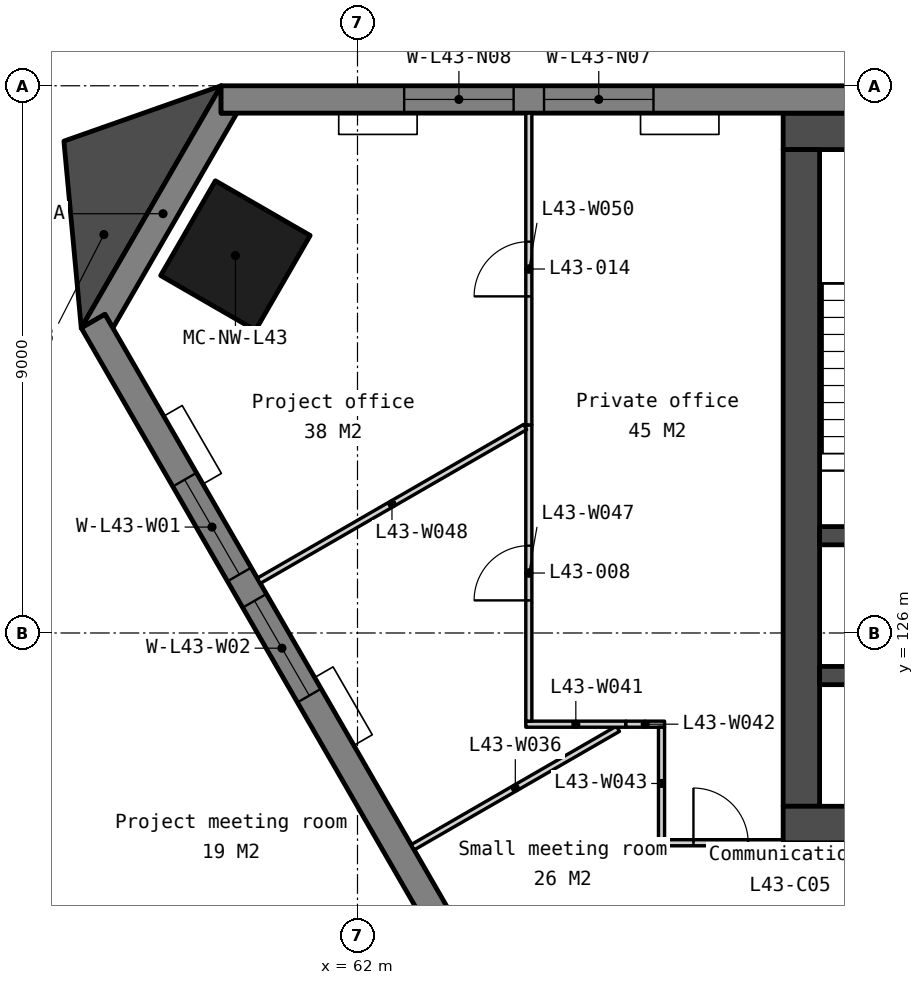
"""IFC4 building model, lengths in metres.
Left out: names, types, materials, properties, quantities, classifications, styles, units other than length and angle.
Written with IfcOpenShell. Run it as: python <this file> out.ifc"""

import sys

from ifc_helpers import new_model, si_unit, direction, frame, frame_2d, origin, origin_2d, place, context, subcontext, project, spatial, polyline, rectangle, outline, extrude, element, fill, save


model = new_model("IFC4")
c1 = context("Model", 3, precision=1e-05, world=origin(), true_north=direction((0.0, 1.0)))
c2 = subcontext(c1, "Body", "Model", "MODEL_VIEW")
j1 = project(units=[si_unit("LENGTHUNIT", "METRE"), si_unit("PLANEANGLEUNIT", "RADIAN")], contexts=[c1])
p1 = place(None, origin())
s1 = spatial("IfcSite", under=j1, at=p1, CompositionType="ELEMENT")
p2 = place(p1, origin())
s2 = spatial("IfcBuilding", under=s1, at=p2, CompositionType="ELEMENT")
p3 = place(p2, frame((0.0, 0.0, 171.5)))
s3 = spatial("IfcBuildingStorey", under=s2, at=p3, CompositionType="ELEMENT", Elevation=171.5)
p4 = place(p3, frame((59.993, 132.208, 0.0), z_axis=(0.0, 0.0, 1.0), x_axis=(-0.5, -0.866025403784, 0.0)))
e1 = element("IfcColumn", 1, at=p4, inside=s3, PredefinedType="COLUMN", context=c2, shape_type="SweptSolid", body=[
    extrude(rectangle(XDim=1.8, YDim=1.8, at=origin_2d()), origin(), (0.0, 0.0, 1.0), 3.9),
])
p5 = place(p3, frame((69.0, 134.25, 0.0), z_axis=(0.0, 0.0, 1.0), x_axis=(1.0, 0.0, 0.0)))
e2 = element("IfcWall", 2, at=p5, inside=s3, PredefinedType="SOLIDWALL", context=c2, shape_type="SweptSolid", body=[
    extrude(rectangle(XDim=22.0, YDim=0.6, at=frame_2d((11.0, 0.0))), origin(), (0.0, 0.0, 1.0), 3.65),
])
p6 = place(p3, frame((69.3, 133.95, 0.0), z_axis=(0.0, 0.0, 1.0), x_axis=(0.0, -1.0, 0.0)))
e3 = element("IfcWall", 3, at=p6, inside=s3, PredefinedType="SOLIDWALL", context=c2, shape_type="SweptSolid", body=[
    extrude(rectangle(XDim=10.8, YDim=0.6, at=frame_2d((5.4, 0.0))), origin(), (0.0, 0.0, 1.0), 3.65),
])
p7 = place(p3, frame((69.0, 122.85, 0.0), z_axis=(0.0, 0.0, 1.0), x_axis=(1.0, 0.0, 0.0)))
e4 = element("IfcWall", 4, at=p7, inside=s3, PredefinedType="SOLIDWALL", context=c2, shape_type="SweptSolid", body=[
    extrude(rectangle(XDim=22.0, YDim=0.6, at=frame_2d((11.0, 0.0))), origin(), (0.0, 0.0, 1.0), 3.65),
])
p8 = place(p7, frame((16.375, 0.0, 0.0)))
e5 = element("IfcOpeningElement", 5, at=p8, cuts=e4, PredefinedType="OPENING", context=c2, shape_type="SweptSolid", body=[
    extrude(rectangle(XDim=1.8, YDim=2.1, at=frame_2d((0.9, 1.05))), frame((0.0, 0.31, 0.0), z_axis=(0.0, -1.0, 0.0), x_axis=(1.0, 0.0, 0.0)), (0.0, 0.0, 1.0), 0.62),
])
p9 = place(p7, frame((3.825, 0.0, 0.0)))
e6 = element("IfcOpeningElement", 6, at=p9, cuts=e4, PredefinedType="OPENING", context=c2, shape_type="SweptSolid", body=[
    extrude(rectangle(XDim=1.8, YDim=2.1, at=frame_2d((0.9, 1.05))), frame((0.0, 0.31, 0.0), z_axis=(0.0, -1.0, 0.0), x_axis=(1.0, 0.0, 0.0)), (0.0, 0.0, 1.0), 0.62),
])
p10 = place(p7, frame((12.85, 0.0, 0.0)))
e7 = element("IfcOpeningElement", 7, at=p10, cuts=e4, PredefinedType="OPENING", context=c2, shape_type="SweptSolid", body=[
    extrude(rectangle(XDim=1.5, YDim=2.1, at=frame_2d((0.75, 1.05))), frame((0.0, 0.31, 0.0), z_axis=(0.0, -1.0, 0.0), x_axis=(1.0, 0.0, 0.0)), (0.0, 0.0, 1.0), 0.62),
])
for number, where, z_axis, x_axis in (
    (8, (69.6, 127.6, 0.0), (0.0, 0.0, 1.0), (1.0, 0.0, 0.0)),
    (9, (69.6, 125.3, 0.0), (0.0, 0.0, 1.0), (1.0, 0.0, 0.0)),
):
    element("IfcWall", number, at=place(p3, frame(where, z_axis=z_axis, x_axis=x_axis)), inside=s3, PredefinedType="SOLIDWALL", context=c2, shape_type="SweptSolid", body=[
        extrude(rectangle(XDim=2.55, YDim=0.3, at=frame_2d((1.275, 0.0))), origin(), (0.0, 0.0, 1.0), 3.65),
    ])
p11 = place(p3, frame((0.0, 0.0, -0.15)))
e10 = element("IfcWall", 10, at=p11, inside=s3, PredefinedType="SOLIDWALL", context=c2, shape_type="SweptSolid", body=[
    extrude(outline(polyline([(59.757, 135.0), (59.757, 134.55), (60.017, 134.55), (57.977, 131.016), (57.847, 131.241), (57.457, 131.016), (59.757, 135.0)])), origin(), (0.0, 0.0, 1.0), 3.8),
])
p12 = place(p3, frame((100.243, 134.775, -0.15), z_axis=(0.0, 0.0, 1.0), x_axis=(-1.0, 0.0, 0.0)))
e11 = element("IfcWall", 11, at=p12, inside=s3, PredefinedType="SOLIDWALL", context=c2, shape_type="SweptSolid", body=[
    extrude(outline(polyline([(40.486, 0.0), (40.486, 3.8), (0.0, 3.8), (0.0, 0.0), (40.486, 0.0)])), frame((0.0, 0.225, 0.0), z_axis=(0.0, -1.0, 0.0), x_axis=(1.0, 0.0, 0.0)), (0.0, 0.0, 1.0), 0.45),
])
p13 = place(p12, frame((3.011, 0.0, 0.95)))
e12 = element("IfcOpeningElement", 12, at=p13, cuts=e11, PredefinedType="OPENING", context=c2, shape_type="SweptSolid", body=[
    extrude(rectangle(XDim=1.8, YDim=2.2, at=frame_2d((0.9, 1.1))), frame((0.0, 0.235, 0.0), z_axis=(0.0, -1.0, 0.0), x_axis=(1.0, 0.0, 0.0)), (0.0, 0.0, 1.0), 0.47),
])
p14 = place(p12, frame((5.311, 0.0, 0.95)))
e13 = element("IfcOpeningElement", 13, at=p14, cuts=e11, PredefinedType="OPENING", context=c2, shape_type="SweptSolid", body=[
    extrude(rectangle(XDim=1.8, YDim=2.2, at=frame_2d((0.9, 1.1))), frame((0.0, 0.235, 0.0), z_axis=(0.0, -1.0, 0.0), x_axis=(1.0, 0.0, 0.0)), (0.0, 0.0, 1.0), 0.47),
])
p15 = place(p12, frame((13.132, 0.0, 0.95)))
e14 = element("IfcOpeningElement", 14, at=p15, cuts=e11, PredefinedType="OPENING", context=c2, shape_type="SweptSolid", body=[
    extrude(rectangle(XDim=1.8, YDim=2.2, at=frame_2d((0.9, 1.1))), frame((0.0, 0.235, 0.0), z_axis=(0.0, -1.0, 0.0), x_axis=(1.0, 0.0, 0.0)), (0.0, 0.0, 1.0), 0.47),
])
p16 = place(p12, frame((15.432, 0.0, 0.95)))
e15 = element("IfcOpeningElement", 15, at=p16, cuts=e11, PredefinedType="OPENING", context=c2, shape_type="SweptSolid", body=[
    extrude(rectangle(XDim=1.8, YDim=2.2, at=frame_2d((0.9, 1.1))), frame((0.0, 0.235, 0.0), z_axis=(0.0, -1.0, 0.0), x_axis=(1.0, 0.0, 0.0)), (0.0, 0.0, 1.0), 0.47),
])
p17 = place(p12, frame((23.254, 0.0, 0.95)))
e16 = element("IfcOpeningElement", 16, at=p17, cuts=e11, PredefinedType="OPENING", context=c2, shape_type="SweptSolid", body=[
    extrude(rectangle(XDim=1.8, YDim=2.2, at=frame_2d((0.9, 1.1))), frame((0.0, 0.235, 0.0), z_axis=(0.0, -1.0, 0.0), x_axis=(1.0, 0.0, 0.0)), (0.0, 0.0, 1.0), 0.47),
])
p18 = place(p12, frame((25.554, 0.0, 0.95)))
e17 = element("IfcOpeningElement", 17, at=p18, cuts=e11, PredefinedType="OPENING", context=c2, shape_type="SweptSolid", body=[
    extrude(rectangle(XDim=1.8, YDim=2.2, at=frame_2d((0.9, 1.1))), frame((0.0, 0.235, 0.0), z_axis=(0.0, -1.0, 0.0), x_axis=(1.0, 0.0, 0.0)), (0.0, 0.0, 1.0), 0.47),
])
p19 = place(p12, frame((33.375, 0.0, 0.95)))
e18 = element("IfcOpeningElement", 18, at=p19, cuts=e11, PredefinedType="OPENING", context=c2, shape_type="SweptSolid", body=[
    extrude(rectangle(XDim=1.8, YDim=2.2, at=frame_2d((0.9, 1.1))), frame((0.0, 0.235, 0.0), z_axis=(0.0, -1.0, 0.0), x_axis=(1.0, 0.0, 0.0)), (0.0, 0.0, 1.0), 0.47),
])
p20 = place(p12, frame((35.675, 0.0, 0.95)))
e19 = element("IfcOpeningElement", 19, at=p20, cuts=e11, PredefinedType="OPENING", context=c2, shape_type="SweptSolid", body=[
    extrude(rectangle(XDim=1.8, YDim=2.2, at=frame_2d((0.9, 1.1))), frame((0.0, 0.235, 0.0), z_axis=(0.0, -1.0, 0.0), x_axis=(1.0, 0.0, 0.0)), (0.0, 0.0, 1.0), 0.47),
])
p21 = place(p3, frame((57.652, 131.129, -0.15), z_axis=(0.0, 0.0, 1.0), x_axis=(0.499997369791, -0.866026922331, 0.0)))
e20 = element("IfcWall", 20, at=p21, inside=s3, PredefinedType="SOLIDWALL", context=c2, shape_type="SweptSolid", body=[
    extrude(outline(polyline([(40.486, 0.0), (40.486, 3.8), (0.0, 3.8), (0.0, 0.0), (40.486, 0.0)])), frame((0.0, 0.225, 0.0), z_axis=(0.0, -1.0, 0.0), x_axis=(1.0, 0.0, 0.0)), (0.0, 0.0, 1.0), 0.45),
])
p22 = place(p21, frame((3.011, 0.0, 0.95)))
e21 = element("IfcOpeningElement", 21, at=p22, cuts=e20, PredefinedType="OPENING", context=c2, shape_type="SweptSolid", body=[
    extrude(rectangle(XDim=1.8, YDim=2.2, at=frame_2d((0.9, 1.1))), frame((0.0, 0.235, 0.0), z_axis=(0.0, -1.0, 0.0), x_axis=(1.0, 0.0, 0.0)), (0.0, 0.0, 1.0), 0.47),
])
p23 = place(p21, frame((5.311, 0.0, 0.95)))
e22 = element("IfcOpeningElement", 22, at=p23, cuts=e20, PredefinedType="OPENING", context=c2, shape_type="SweptSolid", body=[
    extrude(rectangle(XDim=1.8, YDim=2.2, at=frame_2d((0.9, 1.1))), frame((0.0, 0.235, 0.0), z_axis=(0.0, -1.0, 0.0), x_axis=(1.0, 0.0, 0.0)), (0.0, 0.0, 1.0), 0.47),
])
p24 = place(p21, frame((13.132, 0.0, 0.95)))
e23 = element("IfcOpeningElement", 23, at=p24, cuts=e20, PredefinedType="OPENING", context=c2, shape_type="SweptSolid", body=[
    extrude(rectangle(XDim=1.8, YDim=2.2, at=frame_2d((0.9, 1.1))), frame((0.0, 0.235, 0.0), z_axis=(0.0, -1.0, 0.0), x_axis=(1.0, 0.0, 0.0)), (0.0, 0.0, 1.0), 0.47),
])
p25 = place(p21, frame((15.432, 0.0, 0.95)))
e24 = element("IfcOpeningElement", 24, at=p25, cuts=e20, PredefinedType="OPENING", context=c2, shape_type="SweptSolid", body=[
    extrude(rectangle(XDim=1.8, YDim=2.2, at=frame_2d((0.9, 1.1))), frame((0.0, 0.235, 0.0), z_axis=(0.0, -1.0, 0.0), x_axis=(1.0, 0.0, 0.0)), (0.0, 0.0, 1.0), 0.47),
])
p26 = place(p21, frame((23.254, 0.0, 0.95)))
e25 = element("IfcOpeningElement", 25, at=p26, cuts=e20, PredefinedType="OPENING", context=c2, shape_type="SweptSolid", body=[
    extrude(rectangle(XDim=1.8, YDim=2.2, at=frame_2d((0.9, 1.1))), frame((0.0, 0.235, 0.0), z_axis=(0.0, -1.0, 0.0), x_axis=(1.0, 0.0, 0.0)), (0.0, 0.0, 1.0), 0.47),
])
p27 = place(p21, frame((25.554, 0.0, 0.95)))
e26 = element("IfcOpeningElement", 26, at=p27, cuts=e20, PredefinedType="OPENING", context=c2, shape_type="SweptSolid", body=[
    extrude(rectangle(XDim=1.8, YDim=2.2, at=frame_2d((0.9, 1.1))), frame((0.0, 0.235, 0.0), z_axis=(0.0, -1.0, 0.0), x_axis=(1.0, 0.0, 0.0)), (0.0, 0.0, 1.0), 0.47),
])
p28 = place(p21, frame((33.375, 0.0, 0.95)))
e27 = element("IfcOpeningElement", 27, at=p28, cuts=e20, PredefinedType="OPENING", context=c2, shape_type="SweptSolid", body=[
    extrude(rectangle(XDim=1.8, YDim=2.2, at=frame_2d((0.9, 1.1))), frame((0.0, 0.235, 0.0), z_axis=(0.0, -1.0, 0.0), x_axis=(1.0, 0.0, 0.0)), (0.0, 0.0, 1.0), 0.47),
])
p29 = place(p21, frame((35.675, 0.0, 0.95)))
e28 = element("IfcOpeningElement", 28, at=p29, cuts=e20, PredefinedType="OPENING", context=c2, shape_type="SweptSolid", body=[
    extrude(rectangle(XDim=1.8, YDim=2.2, at=frame_2d((0.9, 1.1))), frame((0.0, 0.235, 0.0), z_axis=(0.0, -1.0, 0.0), x_axis=(1.0, 0.0, 0.0)), (0.0, 0.0, 1.0), 0.47),
])
p30 = place(p3, frame((0.0, 0.0, -0.15)))
e29 = element("IfcWall", 29, at=p30, inside=s3, PredefinedType="SOLIDWALL", context=c2, shape_type="SweptSolid", body=[
    extrude(outline(polyline([(59.757, 135.0), (57.172, 134.09), (57.457, 131.016), (59.757, 135.0)])), origin(), (0.0, 0.0, 1.0), 3.8),
])
p31 = place(p3, frame((65.438, 118.093, 0.0), z_axis=(0.0, 0.0, 1.0), x_axis=(0.866029768103, 0.499992440702, 0.0)))
e30 = element("IfcWall", 30, at=p31, inside=s3, PredefinedType="PARTITIONING", context=c2, shape_type="SweptSolid", body=[
    extrude(rectangle(XDim=8.089, YDim=0.1, at=frame_2d((4.044, 0.0))), origin(), (0.0, 0.0, 1.0), 3.65),
])
p32 = place(p31, frame((3.594, 0.0, 0.0)))
e31 = element("IfcOpeningElement", 31, at=p32, cuts=e30, PredefinedType="OPENING", context=c2, shape_type="SweptSolid", body=[
    extrude(rectangle(XDim=0.9, YDim=2.1, at=frame_2d((0.45, 1.05))), frame((0.0, 0.06, 0.0), z_axis=(0.0, -1.0, 0.0), x_axis=(1.0, 0.0, 0.0)), (0.0, 0.0, 1.0), 0.12),
])
p33 = place(p3, frame((62.907, 122.476, 0.0), z_axis=(0.0, 0.0, 1.0), x_axis=(0.866014543207, 0.500018810599, 0.0)))
e32 = element("IfcWall", 32, at=p33, inside=s3, PredefinedType="PARTITIONING", context=c2, shape_type="SweptSolid", body=[
    extrude(rectangle(XDim=3.898, YDim=0.1, at=frame_2d((1.949, 0.0))), origin(), (0.0, 0.0, 1.0), 3.65),
])
p34 = place(p3, frame((66.95, 122.55, 0.0), z_axis=(0.0, 0.0, 1.0), x_axis=(1.0, 0.0, 0.0)))
e33 = element("IfcWall", 33, at=p34, inside=s3, PredefinedType="PARTITIONING", context=c2, shape_type="SweptSolid", body=[
    extrude(rectangle(XDim=2.05, YDim=0.1, at=frame_2d((1.025, 0.0))), origin(), (0.0, 0.0, 1.0), 3.65),
])
p35 = place(p34, frame((0.575, 0.0, 0.0)))
e34 = element("IfcOpeningElement", 34, at=p35, cuts=e33, PredefinedType="OPENING", context=c2, shape_type="SweptSolid", body=[
    extrude(rectangle(XDim=0.9, YDim=2.1, at=frame_2d((0.45, 1.05))), frame((0.0, 0.06, 0.0), z_axis=(0.0, -1.0, 0.0), x_axis=(1.0, 0.0, 0.0)), (0.0, 0.0, 1.0), 0.12),
])
p36 = place(p3, frame((64.768, 124.5, 0.0), z_axis=(0.0, 0.0, 1.0), x_axis=(1.0, 0.0, 0.0)))
e35 = element("IfcWall", 35, at=p36, inside=s3, PredefinedType="PARTITIONING", context=c2, shape_type="SweptSolid", body=[
    extrude(rectangle(XDim=1.646, YDim=0.1, at=frame_2d((0.823, 0.0))), origin(), (0.0, 0.0, 1.0), 3.65),
])
p37 = place(p3, frame((66.414, 124.5, 0.0), z_axis=(0.0, 0.0, 1.0), x_axis=(1.0, 0.0, 0.0)))
e36 = element("IfcWall", 36, at=p37, inside=s3, PredefinedType="PARTITIONING", context=c2, shape_type="SweptSolid", body=[
    extrude(rectangle(XDim=0.636, YDim=0.1, at=frame_2d((0.318, 0.0))), origin(), (0.0, 0.0, 1.0), 3.65),
])
p38 = place(p3, frame((67.0, 122.6, 0.0), z_axis=(0.0, 0.0, 1.0), x_axis=(0.0, 1.0, 0.0)))
e37 = element("IfcWall", 37, at=p38, inside=s3, PredefinedType="PARTITIONING", context=c2, shape_type="SweptSolid", body=[
    extrude(rectangle(XDim=1.85, YDim=0.1, at=frame_2d((0.925, 0.0))), origin(), (0.0, 0.0, 1.0), 3.65),
])
p39 = place(p3, frame((64.818, 124.55, 0.0), z_axis=(0.0, 0.0, 1.0), x_axis=(0.0, 1.0, 0.0)))
e38 = element("IfcWall", 38, at=p39, inside=s3, PredefinedType="PARTITIONING", context=c2, shape_type="SweptSolid", body=[
    extrude(rectangle(XDim=4.872, YDim=0.1, at=frame_2d((2.436, 0.0))), origin(), (0.0, 0.0, 1.0), 3.65),
])
p40 = place(p39, frame((1.986, 0.0, 0.0)))
e39 = element("IfcOpeningElement", 39, at=p40, cuts=e38, PredefinedType="OPENING", context=c2, shape_type="SweptSolid", body=[
    extrude(rectangle(XDim=0.9, YDim=2.1, at=frame_2d((0.45, 1.05))), frame((0.0, 0.06, 0.0), z_axis=(0.0, -1.0, 0.0), x_axis=(1.0, 0.0, 0.0)), (0.0, 0.0, 1.0), 0.12),
])
p41 = place(p3, frame((60.377, 126.859, 0.0), z_axis=(0.0, 0.0, 1.0), x_axis=(0.866030444867, 0.499991268487, 0.0)))
e40 = element("IfcWall", 40, at=p41, inside=s3, PredefinedType="PARTITIONING", context=c2, shape_type="SweptSolid", body=[
    extrude(rectangle(XDim=5.058, YDim=0.1, at=frame_2d((2.529, 0.0))), origin(), (0.0, 0.0, 1.0), 3.65),
])
p42 = place(p3, frame((64.818, 129.422, 0.0), z_axis=(0.0, 0.0, 1.0), x_axis=(0.0, 1.0, 0.0)))
e41 = element("IfcWall", 41, at=p42, inside=s3, PredefinedType="PARTITIONING", context=c2, shape_type="SweptSolid", body=[
    extrude(rectangle(XDim=5.128, YDim=0.1, at=frame_2d((2.564, 0.0))), origin(), (0.0, 0.0, 1.0), 3.65),
])
p43 = place(p42, frame((2.114, 0.0, 0.0)))
e42 = element("IfcOpeningElement", 42, at=p43, cuts=e41, PredefinedType="OPENING", context=c2, shape_type="SweptSolid", body=[
    extrude(rectangle(XDim=0.9, YDim=2.1, at=frame_2d((0.45, 1.05))), frame((0.0, 0.06, 0.0), z_axis=(0.0, -1.0, 0.0), x_axis=(1.0, 0.0, 0.0)), (0.0, 0.0, 1.0), 0.12),
])
p44 = place(p19, origin())
e43 = element("IfcWindow", 43, at=p44, inside=s3, PartitioningType="SINGLE_PANEL", PredefinedType="WINDOW", context=c2, shape_type="SweptSolid", body=[
    extrude(rectangle(XDim=1.8, YDim=2.2, at=frame_2d((0.9, 1.1))), frame((0.0, 0.03, 0.0), z_axis=(0.0, -1.0, 0.0), x_axis=(1.0, 0.0, 0.0)), (0.0, 0.0, 1.0), 0.06),
])
fill(e18, e43)
p45 = place(p20, origin())
e44 = element("IfcWindow", 44, at=p45, inside=s3, PartitioningType="SINGLE_PANEL", PredefinedType="WINDOW", context=c2, shape_type="SweptSolid", body=[
    extrude(rectangle(XDim=1.8, YDim=2.2, at=frame_2d((0.9, 1.1))), frame((0.0, 0.03, 0.0), z_axis=(0.0, -1.0, 0.0), x_axis=(1.0, 0.0, 0.0)), (0.0, 0.0, 1.0), 0.06),
])
fill(e19, e44)
p46 = place(p22, origin())
e45 = element("IfcWindow", 45, at=p46, inside=s3, PartitioningType="SINGLE_PANEL", PredefinedType="WINDOW", context=c2, shape_type="SweptSolid", body=[
    extrude(rectangle(XDim=1.8, YDim=2.2, at=frame_2d((0.9, 1.1))), frame((0.0, 0.03, 0.0), z_axis=(0.0, -1.0, 0.0), x_axis=(1.0, 0.0, 0.0)), (0.0, 0.0, 1.0), 0.06),
])
fill(e21, e45)
p47 = place(p23, origin())
e46 = element("IfcWindow", 46, at=p47, inside=s3, PartitioningType="SINGLE_PANEL", PredefinedType="WINDOW", context=c2, shape_type="SweptSolid", body=[
    extrude(rectangle(XDim=1.8, YDim=2.2, at=frame_2d((0.9, 1.1))), frame((0.0, 0.03, 0.0), z_axis=(0.0, -1.0, 0.0), x_axis=(1.0, 0.0, 0.0)), (0.0, 0.0, 1.0), 0.06),
])
fill(e22, e46)
p48 = place(p35, origin())
e47 = element("IfcDoor", 47, at=p48, inside=s3, OperationType="SINGLE_SWING_LEFT", PredefinedType="DOOR", context=c2, shape_type="SweptSolid", body=[
    extrude(rectangle(XDim=0.9, YDim=2.1, at=frame_2d((0.45, 1.05))), frame((0.0, 0.025, 0.0), z_axis=(0.0, -1.0, 0.0), x_axis=(1.0, 0.0, 0.0)), (0.0, 0.0, 1.0), 0.05),
])
fill(e34, e47)
p49 = place(p40, origin())
e48 = element("IfcDoor", 48, at=p49, inside=s3, OperationType="SINGLE_SWING_LEFT", PredefinedType="DOOR", context=c2, shape_type="SweptSolid", body=[
    extrude(rectangle(XDim=0.9, YDim=2.1, at=frame_2d((0.45, 1.05))), frame((0.0, 0.025, 0.0), z_axis=(0.0, -1.0, 0.0), x_axis=(1.0, 0.0, 0.0)), (0.0, 0.0, 1.0), 0.05),
])
fill(e39, e48)
p50 = place(p43, origin())
e49 = element("IfcDoor", 49, at=p50, inside=s3, OperationType="SINGLE_SWING_LEFT", PredefinedType="DOOR", context=c2, shape_type="SweptSolid", body=[
    extrude(rectangle(XDim=0.9, YDim=2.1, at=frame_2d((0.45, 1.05))), frame((0.0, 0.025, 0.0), z_axis=(0.0, -1.0, 0.0), x_axis=(1.0, 0.0, 0.0)), (0.0, 0.0, 1.0), 0.05),
])
fill(e42, e49)
save(model, sys.argv[1])
